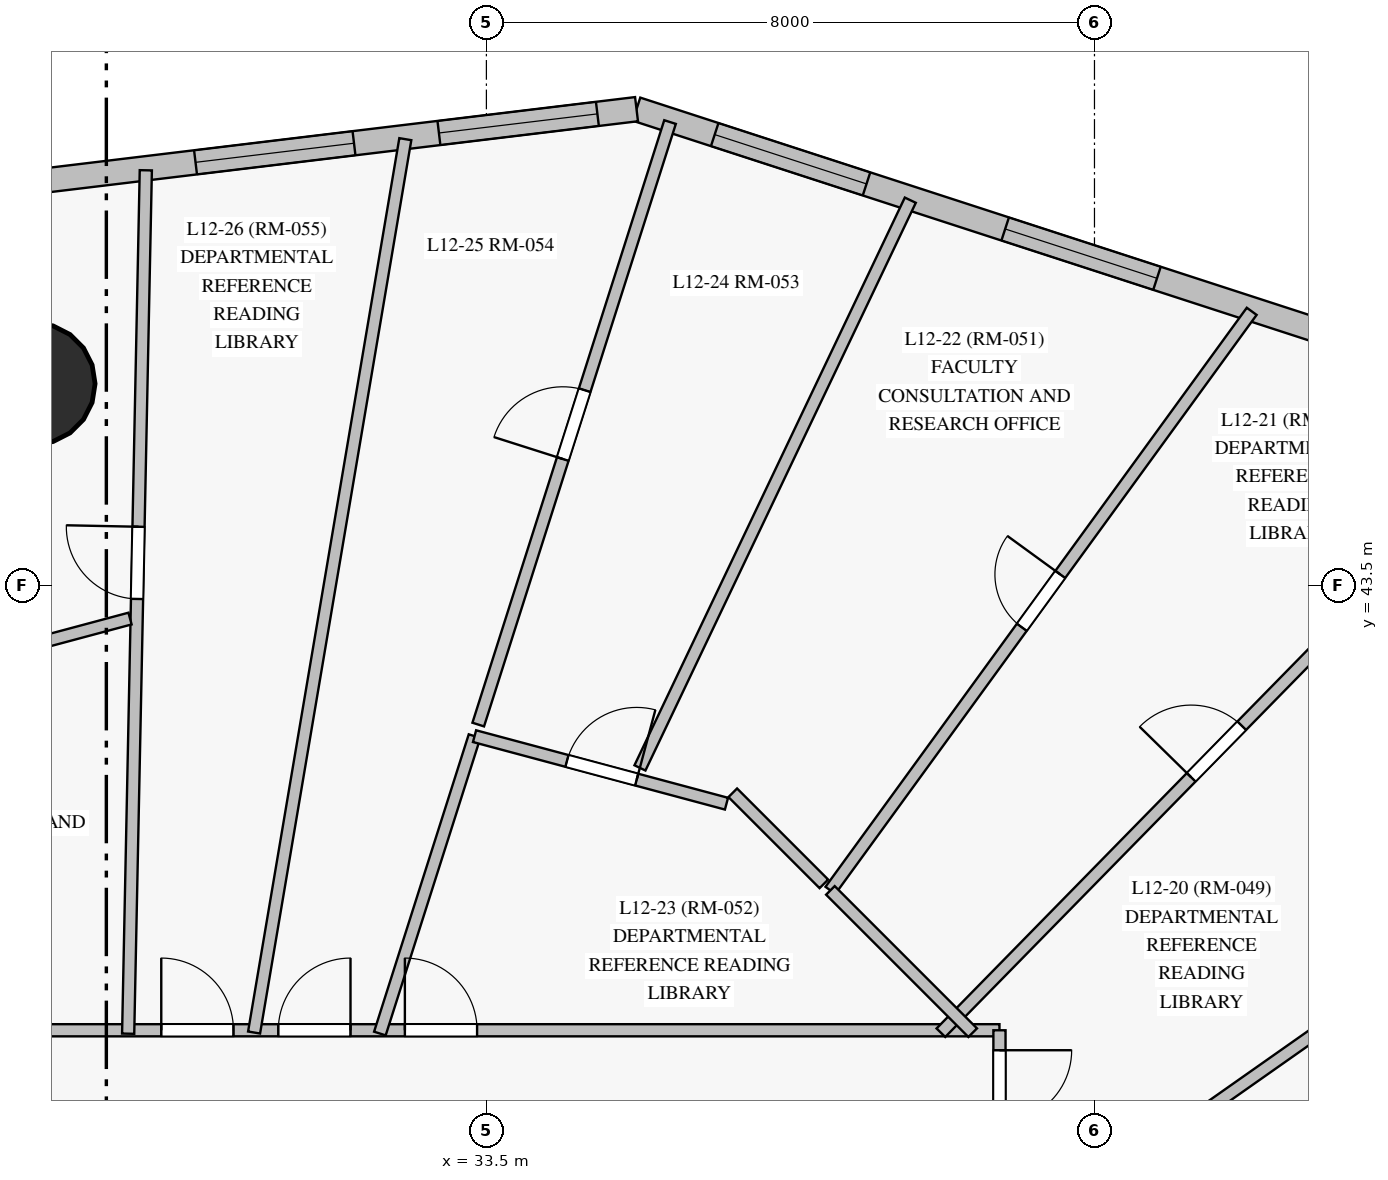
"""IFC4 building model, lengths in metres.
Left out: names, types, materials, properties, quantities, classifications, styles, units other than length and angle.
Written with IfcOpenShell. Run it as: python <this file> out.ifc"""

import sys

from ifc_helpers import new_model, si_unit, direction, frame, frame_2d, origin, origin_with_axes, origin_2d, place, context, subcontext, project, spatial, rectangle, circle, extrude, source, transform, mapped, element, fill, save


model = new_model("IFC4")
c1 = context("Model", 3, precision=1e-05, world=origin(), true_north=direction((0.0, 1.0)))
c2 = subcontext(c1, "Body", "Model", "MODEL_VIEW")
j1 = project(units=[si_unit("LENGTHUNIT", "METRE"), si_unit("PLANEANGLEUNIT", "RADIAN")], contexts=[c1])
p1 = place(None, origin())
s1 = spatial("IfcSite", under=j1, at=p1, CompositionType="ELEMENT")
p2 = place(p1, origin())
s2 = spatial("IfcBuilding", under=s1, at=p2, CompositionType="ELEMENT")
p3 = place(p2, frame((0.0, 0.0, 48.1)))
s3 = spatial("IfcBuildingStorey", under=s2, at=p3, CompositionType="ELEMENT", Elevation=48.1)
m1 = source(origin_with_axes(), c2, "Body", "SweptSolid", [
    extrude(circle(Radius=0.8, at=origin_2d()), origin(), (0.0, 0.0, 1.0), 3.6),
])
p4 = place(p3, frame((27.552, 46.156, 0.0), z_axis=(0.0, 0.0, 1.0), x_axis=(1.0, 0.0, 0.0)))
e1 = element("IfcColumn", 1, at=p4, inside=s3, PredefinedType="COLUMN", context=c2, shape_type="MappedRepresentation", body=[
    mapped(m1, transform((0.0, 0.0, 0.0), scale=1.0)),
])
p5 = place(p3, frame((45.446, 46.528, 0.0), z_axis=(0.0, 0.0, 1.0), x_axis=(-0.951047758386, 0.309043947148, 0.0)))
e2 = element("IfcWall", 2, at=p5, inside=s3, PredefinedType="SOLIDWALL", context=c2, shape_type="SweptSolid", body=[
    extrude(rectangle(XDim=10.484, YDim=0.32, at=frame_2d((5.242, 0.0))), origin(), (0.0, 0.0, 1.0), 3.35),
])
p6 = place(p5, frame((3.284, 0.0, 0.85)))
e3 = element("IfcOpeningElement", 3, at=p6, cuts=e2, PredefinedType="OPENING", context=c2, shape_type="SweptSolid", body=[
    extrude(rectangle(XDim=2.1, YDim=1.95, at=frame_2d((1.05, 0.975))), frame((0.0, 0.17, 0.0), z_axis=(0.0, -1.0, 0.0), x_axis=(1.0, 0.0, 0.0)), (0.0, 0.0, 1.0), 0.34),
])
p7 = place(p5, frame((7.302, 0.0, 0.85)))
e4 = element("IfcOpeningElement", 4, at=p7, cuts=e2, PredefinedType="OPENING", context=c2, shape_type="SweptSolid", body=[
    extrude(rectangle(XDim=2.1, YDim=1.95, at=frame_2d((1.05, 0.975))), frame((0.0, 0.17, 0.0), z_axis=(0.0, -1.0, 0.0), x_axis=(1.0, 0.0, 0.0)), (0.0, 0.0, 1.0), 0.34),
])
p8 = place(p3, frame((35.475, 49.768, 0.0), z_axis=(0.0, 0.0, 1.0), x_axis=(-0.992812344763, -0.1196814442, 0.0)))
e5 = element("IfcWall", 5, at=p8, inside=s3, PredefinedType="SOLIDWALL", context=c2, shape_type="SweptSolid", body=[
    extrude(rectangle(XDim=15.224, YDim=0.32, at=frame_2d((7.612, 0.0))), origin(), (0.0, 0.0, 1.0), 3.35),
])
p9 = place(p8, frame((0.519, 0.0, 0.85)))
e6 = element("IfcOpeningElement", 6, at=p9, cuts=e5, PredefinedType="OPENING", context=c2, shape_type="SweptSolid", body=[
    extrude(rectangle(XDim=2.1, YDim=1.95, at=frame_2d((1.05, 0.975))), frame((0.0, 0.17, 0.0), z_axis=(0.0, -1.0, 0.0), x_axis=(1.0, 0.0, 0.0)), (0.0, 0.0, 1.0), 0.34),
])
p10 = place(p8, frame((3.744, 0.0, 0.85)))
e7 = element("IfcOpeningElement", 7, at=p10, cuts=e5, PredefinedType="OPENING", context=c2, shape_type="SweptSolid", body=[
    extrude(rectangle(XDim=2.1, YDim=1.95, at=frame_2d((1.05, 0.975))), frame((0.0, 0.17, 0.0), z_axis=(0.0, -1.0, 0.0), x_axis=(1.0, 0.0, 0.0)), (0.0, 0.0, 1.0), 0.34),
])
p11 = place(p8, frame((7.784, 0.0, 0.85)))
e8 = element("IfcOpeningElement", 8, at=p11, cuts=e5, PredefinedType="OPENING", context=c2, shape_type="SweptSolid", body=[
    extrude(rectangle(XDim=2.1, YDim=1.95, at=frame_2d((1.05, 0.975))), frame((0.0, 0.17, 0.0), z_axis=(0.0, -1.0, 0.0), x_axis=(1.0, 0.0, 0.0)), (0.0, 0.0, 1.0), 0.34),
])
p12 = place(p8, frame((11.791, 0.0, 0.85)))
e9 = element("IfcOpeningElement", 9, at=p12, cuts=e5, PredefinedType="OPENING", context=c2, shape_type="SweptSolid", body=[
    extrude(rectangle(XDim=2.1, YDim=1.95, at=frame_2d((1.05, 0.975))), frame((0.0, 0.17, 0.0), z_axis=(0.0, -1.0, 0.0), x_axis=(1.0, 0.0, 0.0)), (0.0, 0.0, 1.0), 0.34),
])
p13 = place(p3, frame((10.5, 37.65, 0.0), z_axis=(0.0, 0.0, 1.0), x_axis=(1.0, 0.0, 0.0)))
e10 = element("IfcWall", 10, at=p13, inside=s3, PredefinedType="PARTITIONING", context=c2, shape_type="SweptSolid", body=[
    extrude(rectangle(XDim=29.75, YDim=0.16, at=frame_2d((14.875, 0.0))), origin(), (0.0, 0.0, 1.0), 2.75),
])
p14 = place(p13, frame((21.927, 0.0, 0.0)))
e11 = element("IfcOpeningElement", 11, at=p14, cuts=e10, PredefinedType="OPENING", context=c2, shape_type="SweptSolid", body=[
    extrude(rectangle(XDim=0.95, YDim=2.15, at=frame_2d((0.475, 1.075))), frame((0.0, 0.09, 0.0), z_axis=(0.0, -1.0, 0.0), x_axis=(1.0, 0.0, 0.0)), (0.0, 0.0, 1.0), 0.18),
])
p15 = place(p13, frame((20.262, 0.0, 0.0)))
e12 = element("IfcOpeningElement", 12, at=p15, cuts=e10, PredefinedType="OPENING", context=c2, shape_type="SweptSolid", body=[
    extrude(rectangle(XDim=0.95, YDim=2.15, at=frame_2d((0.475, 1.075))), frame((0.0, 0.09, 0.0), z_axis=(0.0, -1.0, 0.0), x_axis=(1.0, 0.0, 0.0)), (0.0, 0.0, 1.0), 0.18),
])
p16 = place(p13, frame((18.722, 0.0, 0.0)))
e13 = element("IfcOpeningElement", 13, at=p16, cuts=e10, PredefinedType="OPENING", context=c2, shape_type="SweptSolid", body=[
    extrude(rectangle(XDim=0.95, YDim=2.15, at=frame_2d((0.475, 1.075))), frame((0.0, 0.09, 0.0), z_axis=(0.0, -1.0, 0.0), x_axis=(1.0, 0.0, 0.0)), (0.0, 0.0, 1.0), 0.18),
])
p17 = place(p13, frame((14.4, 0.0, 0.0)))
e14 = element("IfcOpeningElement", 14, at=p17, cuts=e10, PredefinedType="OPENING", context=c2, shape_type="SweptSolid", body=[
    extrude(rectangle(XDim=0.95, YDim=2.15, at=frame_2d((0.475, 1.075))), frame((0.0, 0.09, 0.0), z_axis=(0.0, -1.0, 0.0), x_axis=(1.0, 0.0, 0.0)), (0.0, 0.0, 1.0), 0.18),
])
p18 = place(p13, frame((6.962, 0.0, 0.0)))
e15 = element("IfcOpeningElement", 15, at=p18, cuts=e10, PredefinedType="OPENING", context=c2, shape_type="SweptSolid", body=[
    extrude(rectangle(XDim=0.95, YDim=2.15, at=frame_2d((0.475, 1.075))), frame((0.0, 0.09, 0.0), z_axis=(0.0, -1.0, 0.0), x_axis=(1.0, 0.0, 0.0)), (0.0, 0.0, 1.0), 0.18),
])
p19 = place(p3, frame((40.25, 37.65, 0.0), z_axis=(0.0, 0.0, 1.0), x_axis=(0.0, -1.0, 0.0)))
e16 = element("IfcWall", 16, at=p19, inside=s3, PredefinedType="PARTITIONING", context=c2, shape_type="SweptSolid", body=[
    extrude(rectangle(XDim=22.3, YDim=0.16, at=frame_2d((11.15, 0.0))), origin(), (0.0, 0.0, 1.0), 2.75),
])
p20 = place(p19, frame((14.02, 0.0, 0.0)))
e17 = element("IfcOpeningElement", 17, at=p20, cuts=e16, PredefinedType="OPENING", context=c2, shape_type="SweptSolid", body=[
    extrude(rectangle(XDim=0.95, YDim=2.15, at=frame_2d((0.475, 1.075))), frame((0.0, 0.09, 0.0), z_axis=(0.0, -1.0, 0.0), x_axis=(1.0, 0.0, 0.0)), (0.0, 0.0, 1.0), 0.18),
])
p21 = place(p19, frame((10.915, 0.0, 0.0)))
e18 = element("IfcOpeningElement", 18, at=p21, cuts=e16, PredefinedType="OPENING", context=c2, shape_type="SweptSolid", body=[
    extrude(rectangle(XDim=0.95, YDim=2.15, at=frame_2d((0.475, 1.075))), frame((0.0, 0.09, 0.0), z_axis=(0.0, -1.0, 0.0), x_axis=(1.0, 0.0, 0.0)), (0.0, 0.0, 1.0), 0.18),
])
p22 = place(p19, frame((7.051, 0.0, 0.0)))
e19 = element("IfcOpeningElement", 19, at=p22, cuts=e16, PredefinedType="OPENING", context=c2, shape_type="SweptSolid", body=[
    extrude(rectangle(XDim=0.86, YDim=2.1, at=frame_2d((0.43, 1.05))), frame((0.0, 0.09, 0.0), z_axis=(0.0, -1.0, 0.0), x_axis=(1.0, 0.0, 0.0)), (0.0, 0.0, 1.0), 0.18),
])
p23 = place(p19, frame((3.49, 0.0, 0.0)))
e20 = element("IfcOpeningElement", 20, at=p23, cuts=e16, PredefinedType="OPENING", context=c2, shape_type="SweptSolid", body=[
    extrude(rectangle(XDim=0.95, YDim=2.15, at=frame_2d((0.475, 1.075))), frame((0.0, 0.09, 0.0), z_axis=(0.0, -1.0, 0.0), x_axis=(1.0, 0.0, 0.0)), (0.0, 0.0, 1.0), 0.18),
])
p24 = place(p19, frame((1.36, 0.0, 0.0)))
e21 = element("IfcOpeningElement", 21, at=p24, cuts=e16, PredefinedType="OPENING", context=c2, shape_type="SweptSolid", body=[
    extrude(rectangle(XDim=0.95, YDim=2.15, at=frame_2d((0.475, 1.075))), frame((0.0, 0.09, 0.0), z_axis=(0.0, -1.0, 0.0), x_axis=(1.0, 0.0, 0.0)), (0.0, 0.0, 1.0), 0.18),
])
p25 = place(p19, frame((0.263, 0.0, 0.0)))
e22 = element("IfcOpeningElement", 22, at=p25, cuts=e16, PredefinedType="OPENING", context=c2, shape_type="SweptSolid", body=[
    extrude(rectangle(XDim=0.95, YDim=2.15, at=frame_2d((0.475, 1.075))), frame((0.0, 0.09, 0.0), z_axis=(0.0, -1.0, 0.0), x_axis=(1.0, 0.0, 0.0)), (0.0, 0.0, 1.0), 0.18),
])
p26 = place(p19, frame((15.155, 0.0, 0.0)))
e23 = element("IfcOpeningElement", 23, at=p26, cuts=e16, PredefinedType="OPENING", context=c2, shape_type="SweptSolid", body=[
    extrude(rectangle(XDim=0.95, YDim=2.15, at=frame_2d((0.475, 1.075))), frame((0.0, 0.09, 0.0), z_axis=(0.0, -1.0, 0.0), x_axis=(1.0, 0.0, 0.0)), (0.0, 0.0, 1.0), 0.18),
])
p27 = place(p19, frame((5.17, 0.0, 0.0)))
e24 = element("IfcOpeningElement", 24, at=p27, cuts=e16, PredefinedType="OPENING", context=c2, shape_type="SweptSolid", body=[
    extrude(rectangle(XDim=0.86, YDim=2.04, at=frame_2d((0.43, 1.02))), frame((0.0, 0.09, 0.0), z_axis=(0.0, -1.0, 0.0), x_axis=(1.0, 0.0, 0.0)), (0.0, 0.0, 1.0), 0.18),
])
p28 = place(p3, frame((40.208, 31.226, 0.0), z_axis=(0.0, 0.0, 1.0), x_axis=(0.925535120156, 0.378661776995, 0.0)))
e25 = element("IfcWall", 25, at=p28, inside=s3, PredefinedType="PARTITIONING", context=c2, shape_type="SweptSolid", body=[
    extrude(rectangle(XDim=15.115, YDim=0.16, at=frame_2d((7.557, 0.0))), origin(), (0.0, 0.0, 1.0), 3.35),
])
p29 = place(p3, frame((40.224, 32.708, 0.0), z_axis=(0.0, 0.0, 1.0), x_axis=(0.881639877006, 0.471922798001, 0.0)))
e26 = element("IfcWall", 26, at=p29, inside=s3, PredefinedType="PARTITIONING", context=c2, shape_type="SweptSolid", body=[
    extrude(rectangle(XDim=13.591, YDim=0.16, at=frame_2d((6.796, 0.0))), origin(), (0.0, 0.0, 1.0), 3.35),
])
p30 = place(p3, frame((40.226, 34.671, 0.0), z_axis=(0.0, 0.0, 1.0), x_axis=(0.818038780685, 0.5751630667, 0.0)))
e27 = element("IfcWall", 27, at=p30, inside=s3, PredefinedType="PARTITIONING", context=c2, shape_type="SweptSolid", body=[
    extrude(rectangle(XDim=11.938, YDim=0.16, at=frame_2d((5.969, 0.0))), origin(), (0.0, 0.0, 1.0), 3.35),
])
p31 = place(p3, frame((30.444, 37.62, 0.0), z_axis=(0.0, 0.0, 1.0), x_axis=(0.166922631411, 0.98596999707, 0.0)))
e28 = element("IfcWall", 28, at=p31, inside=s3, PredefinedType="PARTITIONING", context=c2, shape_type="SweptSolid", body=[
    extrude(rectangle(XDim=11.92, YDim=0.16, at=frame_2d((5.96, 0.0))), origin(), (0.0, 0.0, 1.0), 3.35),
])
p32 = place(p3, frame((28.787, 37.605, 0.0), z_axis=(0.0, 0.0, 1.0), x_axis=(0.020435915355, 0.999791164876, 0.0)))
e29 = element("IfcWall", 29, at=p32, inside=s3, PredefinedType="PARTITIONING", context=c2, shape_type="SweptSolid", body=[
    extrude(rectangle(XDim=11.361, YDim=0.16, at=frame_2d((5.681, 0.0))), origin(), (0.0, 0.0, 1.0), 3.35),
])
p33 = place(p32, frame((5.721, 0.0, 0.0)))
e30 = element("IfcOpeningElement", 30, at=p33, cuts=e29, PredefinedType="OPENING", context=c2, shape_type="SweptSolid", body=[
    extrude(rectangle(XDim=0.95, YDim=2.15, at=frame_2d((0.475, 1.075))), frame((0.0, 0.09, 0.0), z_axis=(0.0, -1.0, 0.0), x_axis=(1.0, 0.0, 0.0)), (0.0, 0.0, 1.0), 0.18),
])
p34 = place(p3, frame((39.479, 37.618, 0.0), z_axis=(0.0, 0.0, 1.0), x_axis=(0.699941263182, 0.714200411716, 0.0)))
e31 = element("IfcWall", 31, at=p34, inside=s3, PredefinedType="PARTITIONING", context=c2, shape_type="SweptSolid", body=[
    extrude(rectangle(XDim=10.41, YDim=0.16, at=frame_2d((5.205, 0.0))), origin(), (0.0, 0.0, 1.0), 3.35),
])
p35 = place(p34, frame((4.705, 0.0, 0.0)))
e32 = element("IfcOpeningElement", 32, at=p35, cuts=e31, PredefinedType="OPENING", context=c2, shape_type="SweptSolid", body=[
    extrude(rectangle(XDim=0.95, YDim=2.15, at=frame_2d((0.475, 1.075))), frame((0.0, 0.09, 0.0), z_axis=(0.0, -1.0, 0.0), x_axis=(1.0, 0.0, 0.0)), (0.0, 0.0, 1.0), 0.18),
])
p36 = place(p3, frame((38.026, 39.49, 0.0), z_axis=(0.0, 0.0, 1.0), x_axis=(0.588344255405, 0.808610559622, 0.0)))
e33 = element("IfcWall", 33, at=p36, inside=s3, PredefinedType="PARTITIONING", context=c2, shape_type="SweptSolid", body=[
    extrude(rectangle(XDim=9.421, YDim=0.16, at=frame_2d((4.711, 0.0))), origin(), (0.0, 0.0, 1.0), 3.35),
])
p37 = place(p36, frame((4.281, 0.0, 0.0)))
e34 = element("IfcOpeningElement", 34, at=p37, cuts=e33, PredefinedType="OPENING", context=c2, shape_type="SweptSolid", body=[
    extrude(rectangle(XDim=0.86, YDim=2.04, at=frame_2d((0.43, 1.02))), frame((0.0, 0.09, 0.0), z_axis=(0.0, -1.0, 0.0), x_axis=(1.0, 0.0, 0.0)), (0.0, 0.0, 1.0), 0.18),
])
p38 = place(p3, frame((33.393, 41.672, 0.0), z_axis=(0.0, 0.0, 1.0), x_axis=(0.30332600817, 0.952886841534, 0.0)))
e35 = element("IfcWall", 35, at=p38, inside=s3, PredefinedType="PARTITIONING", context=c2, shape_type="SweptSolid", body=[
    extrude(rectangle(XDim=8.318, YDim=0.16, at=frame_2d((4.159, 0.0))), origin(), (0.0, 0.0, 1.0), 3.35),
])
p39 = place(p38, frame((3.667, 0.0, 0.0)))
e36 = element("IfcOpeningElement", 36, at=p39, cuts=e35, PredefinedType="OPENING", context=c2, shape_type="SweptSolid", body=[
    extrude(rectangle(XDim=0.95, YDim=2.15, at=frame_2d((0.475, 1.075))), frame((0.0, 0.09, 0.0), z_axis=(0.0, -1.0, 0.0), x_axis=(1.0, 0.0, 0.0)), (0.0, 0.0, 1.0), 0.18),
])
p40 = place(p3, frame((35.52, 41.102, 0.0), z_axis=(0.0, 0.0, 1.0), x_axis=(0.429966802058, 0.902844698233, 0.0)))
e37 = element("IfcWall", 37, at=p40, inside=s3, PredefinedType="PARTITIONING", context=c2, shape_type="SweptSolid", body=[
    extrude(rectangle(XDim=8.272, YDim=0.16, at=frame_2d((4.136, 0.0))), origin(), (0.0, 0.0, 1.0), 3.35),
])
p41 = place(p3, frame((28.812, 43.066, 0.0), z_axis=(0.0, 0.0, 1.0), x_axis=(-0.96592551769, -0.258820196808, 0.0)))
e38 = element("IfcWall", 38, at=p41, inside=s3, PredefinedType="PARTITIONING", context=c2, shape_type="SweptSolid", body=[
    extrude(rectangle(XDim=6.287, YDim=0.16, at=frame_2d((3.144, 0.0))), origin(), (0.0, 0.0, 1.0), 2.75),
])
p42 = place(p3, frame((32.099, 37.607, 0.0), z_axis=(0.0, 0.0, 1.0), x_axis=(0.303390190683, 0.952866408369, 0.0)))
e39 = element("IfcWall", 39, at=p42, inside=s3, PredefinedType="PARTITIONING", context=c2, shape_type="SweptSolid", body=[
    extrude(rectangle(XDim=4.106, YDim=0.16, at=frame_2d((2.053, 0.0))), origin(), (0.0, 0.0, 1.0), 3.35),
])
p43 = place(p3, frame((33.344, 41.519, 0.0), z_axis=(0.0, 0.0, 1.0), x_axis=(0.965920102757, -0.258840404672, 0.0)))
e40 = element("IfcWall", 40, at=p43, inside=s3, PredefinedType="PARTITIONING", context=c2, shape_type="SweptSolid", body=[
    extrude(rectangle(XDim=3.431, YDim=0.16, at=frame_2d((1.716, 0.0))), origin(), (0.0, 0.0, 1.0), 3.35),
])
p44 = place(p43, frame((1.259, 0.0, 0.0)))
e41 = element("IfcOpeningElement", 41, at=p44, cuts=e40, PredefinedType="OPENING", context=c2, shape_type="SweptSolid", body=[
    extrude(rectangle(XDim=0.95, YDim=2.15, at=frame_2d((0.475, 1.075))), frame((0.0, 0.09, 0.0), z_axis=(0.0, -1.0, 0.0), x_axis=(1.0, 0.0, 0.0)), (0.0, 0.0, 1.0), 0.18),
])
p45 = place(p3, frame((39.898, 37.618, 0.0), z_axis=(0.0, 0.0, 1.0), x_axis=(-0.707106781187, 0.707106781187, 0.0)))
e42 = element("IfcWall", 42, at=p45, inside=s3, PredefinedType="PARTITIONING", context=c2, shape_type="SweptSolid", body=[
    extrude(rectangle(XDim=2.647, YDim=0.16, at=frame_2d((1.324, 0.0))), origin(), (0.0, 0.0, 1.0), 2.75),
])
p46 = place(p3, frame((37.94, 39.576, 0.0), z_axis=(0.0, 0.0, 1.0), x_axis=(-0.707034748713, 0.707178806323, 0.0)))
e43 = element("IfcWall", 43, at=p46, inside=s3, PredefinedType="PARTITIONING", context=c2, shape_type="SweptSolid", body=[
    extrude(rectangle(XDim=1.695, YDim=0.16, at=frame_2d((0.847, 0.0))), origin(), (0.0, 0.0, 1.0), 2.75),
])
m2 = source(origin_with_axes(), c2, "Body", "SweptSolid", [
    extrude(rectangle(XDim=2.1, YDim=1.95, at=frame_2d((1.05, 0.975))), frame((0.0, 0.03, 0.0), z_axis=(0.0, -1.0, 0.0), x_axis=(1.0, 0.0, 0.0)), (0.0, 0.0, 1.0), 0.06),
])
p47 = place(p6, origin())
e44 = element("IfcWindow", 44, at=p47, inside=s3, PartitioningType="SINGLE_PANEL", PredefinedType="WINDOW", context=c2, shape_type="MappedRepresentation", body=[
    mapped(m2, transform((0.0, 0.0, 0.0), scale=1.0)),
])
fill(e3, e44)
p48 = place(p7, origin())
e45 = element("IfcWindow", 45, at=p48, inside=s3, PartitioningType="SINGLE_PANEL", PredefinedType="WINDOW", context=c2, shape_type="MappedRepresentation", body=[
    mapped(m2, transform((0.0, 0.0, 0.0), scale=1.0)),
])
fill(e4, e45)
p49 = place(p9, origin())
e46 = element("IfcWindow", 46, at=p49, inside=s3, PartitioningType="SINGLE_PANEL", PredefinedType="WINDOW", context=c2, shape_type="MappedRepresentation", body=[
    mapped(m2, transform((0.0, 0.0, 0.0), scale=1.0)),
])
fill(e6, e46)
p50 = place(p10, origin())
e47 = element("IfcWindow", 47, at=p50, inside=s3, PartitioningType="SINGLE_PANEL", PredefinedType="WINDOW", context=c2, shape_type="MappedRepresentation", body=[
    mapped(m2, transform((0.0, 0.0, 0.0), scale=1.0)),
])
fill(e7, e47)
m3 = source(origin_with_axes(), c2, "Body", "SweptSolid", [
    extrude(rectangle(XDim=0.95, YDim=2.15, at=frame_2d((0.475, 1.075))), frame((0.0, 0.025, 0.0), z_axis=(0.0, -1.0, 0.0), x_axis=(1.0, 0.0, 0.0)), (0.0, 0.0, 1.0), 0.05),
])
p51 = place(p25, origin())
e48 = element("IfcDoor", 48, at=p51, inside=s3, OperationType="SINGLE_SWING_LEFT", PredefinedType="DOOR", context=c2, shape_type="MappedRepresentation", body=[
    mapped(m3, transform((0.0, 0.0, 0.0), scale=1.0)),
])
fill(e22, e48)
p52 = place(p14, origin())
e49 = element("IfcDoor", 49, at=p52, inside=s3, OperationType="SINGLE_SWING_LEFT", PredefinedType="DOOR", context=c2, shape_type="MappedRepresentation", body=[
    mapped(m3, transform((0.0, 0.0, 0.0), scale=1.0)),
])
fill(e11, e49)
p53 = place(p15, origin())
e50 = element("IfcDoor", 50, at=p53, inside=s3, OperationType="SINGLE_SWING_RIGHT", PredefinedType="DOOR", context=c2, shape_type="MappedRepresentation", body=[
    mapped(m3, transform((0.0, 0.0, 0.0), scale=1.0)),
])
fill(e12, e50)
p54 = place(p16, origin())
e51 = element("IfcDoor", 51, at=p54, inside=s3, OperationType="SINGLE_SWING_LEFT", PredefinedType="DOOR", context=c2, shape_type="MappedRepresentation", body=[
    mapped(m3, transform((0.0, 0.0, 0.0), scale=1.0)),
])
fill(e13, e51)
p55 = place(p35, origin())
e52 = element("IfcDoor", 52, at=p55, inside=s3, OperationType="SINGLE_SWING_LEFT", PredefinedType="DOOR", context=c2, shape_type="MappedRepresentation", body=[
    mapped(m3, transform((0.0, 0.0, 0.0), scale=1.0)),
])
fill(e32, e52)
p56 = place(p44, origin())
e53 = element("IfcDoor", 53, at=p56, inside=s3, OperationType="SINGLE_SWING_RIGHT", PredefinedType="DOOR", context=c2, shape_type="MappedRepresentation", body=[
    mapped(m3, transform((0.0, 0.0, 0.0), scale=1.0)),
])
fill(e41, e53)
p57 = place(p39, origin())
e54 = element("IfcDoor", 54, at=p57, inside=s3, OperationType="SINGLE_SWING_LEFT", PredefinedType="DOOR", context=c2, shape_type="MappedRepresentation", body=[
    mapped(m3, transform((0.0, 0.0, 0.0), scale=1.0)),
])
fill(e36, e54)
p58 = place(p33, origin())
e55 = element("IfcDoor", 55, at=p58, inside=s3, OperationType="SINGLE_SWING_RIGHT", PredefinedType="DOOR", context=c2, shape_type="MappedRepresentation", body=[
    mapped(m3, transform((0.0, 0.0, 0.0), scale=1.0)),
])
fill(e30, e55)
m4 = source(origin_with_axes(), c2, "Body", "SweptSolid", [
    extrude(rectangle(XDim=0.86, YDim=2.04, at=frame_2d((0.43, 1.02))), frame((0.0, 0.025, 0.0), z_axis=(0.0, -1.0, 0.0), x_axis=(1.0, 0.0, 0.0)), (0.0, 0.0, 1.0), 0.05),
])
p59 = place(p37, origin())
e56 = element("IfcDoor", 56, at=p59, inside=s3, OperationType="SINGLE_SWING_RIGHT", PredefinedType="DOOR", context=c2, shape_type="MappedRepresentation", body=[
    mapped(m4, transform((0.0, 0.0, 0.0), scale=1.0)),
])
fill(e34, e56)
save(model, sys.argv[1])
